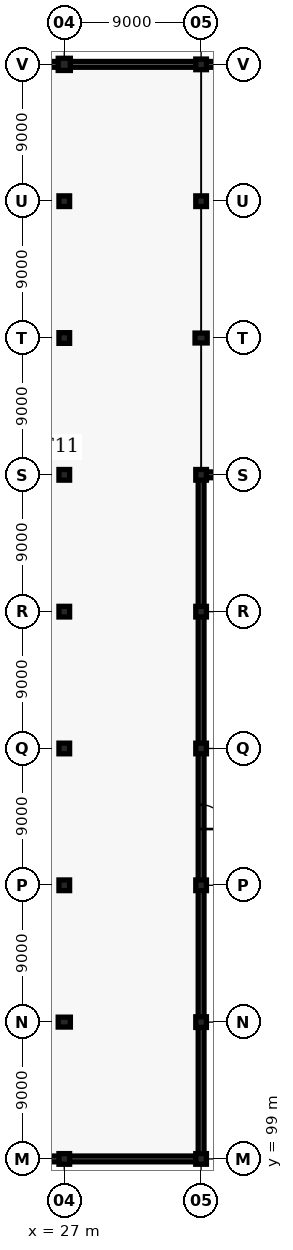
"""IFC4 building model, lengths in metres.
Left out: names, types, materials, properties, quantities, classifications, styles, units other than length and angle.
Written with IfcOpenShell. Run it as: python <this file> out.ifc"""

import sys

from ifc_helpers import new_model, si_unit, direction, frame, frame_2d, origin, origin_2d, place, context, subcontext, project, spatial, rectangle, circle, extrude, element, fill, save


model = new_model("IFC4")
c1 = context("Model", 3, precision=1e-05, world=origin(), true_north=direction((0.0, 1.0)))
c2 = subcontext(c1, "Body", "Model", "MODEL_VIEW")
j1 = project(units=[si_unit("LENGTHUNIT", "METRE"), si_unit("PLANEANGLEUNIT", "RADIAN")], contexts=[c1])
p1 = place(None, origin())
s1 = spatial("IfcSite", under=j1, at=p1, CompositionType="ELEMENT")
p2 = place(p1, origin())
s2 = spatial("IfcBuilding", under=s1, at=p2, CompositionType="ELEMENT")
p3 = place(p2, origin())
s3 = spatial("IfcBuildingStorey", under=s2, at=p3, CompositionType="ELEMENT", Elevation=0.0)
p4 = place(p3, frame((27.0, 99.0, 0.0), z_axis=(0.0, 0.0, 1.0), x_axis=(1.0, 0.0, 0.0)))
e1 = element("IfcColumn", 1, at=p4, inside=s3, PredefinedType="COLUMN", context=c2, shape_type="SweptSolid", body=[
    extrude(rectangle(XDim=0.7, YDim=0.7, at=origin_2d()), origin(), (0.0, 0.0, 1.0), 5.4),
])
p5 = place(p3, frame((27.0, 108.0, 0.0), z_axis=(0.0, 0.0, 1.0), x_axis=(1.0, 0.0, 0.0)))
e2 = element("IfcColumn", 2, at=p5, inside=s3, PredefinedType="COLUMN", context=c2, shape_type="SweptSolid", body=[
    extrude(rectangle(XDim=0.8, YDim=0.65, at=origin_2d()), origin(), (0.0, 0.0, 1.0), 5.4),
])
for number, where, z_axis, x_axis in (
    (3, (27.0, 117.0, 0.0), (0.0, 0.0, 1.0), (1.0, 0.0, 0.0)),
    (4, (27.0, 126.0, 0.0), (0.0, 0.0, 1.0), (1.0, 0.0, 0.0)),
    (5, (27.0, 135.0, 0.0), (0.0, 0.0, 1.0), (1.0, 0.0, 0.0)),
    (6, (27.0, 144.0, 0.0), (0.0, 0.0, 1.0), (1.0, 0.0, 0.0)),
    (7, (27.0, 153.0, 0.0), (0.0, 0.0, 1.0), (1.0, 0.0, 0.0)),
    (8, (27.0, 162.0, 0.0), (0.0, 0.0, 1.0), (1.0, 0.0, 0.0)),
):
    element("IfcColumn", number, at=place(p3, frame(where, z_axis=z_axis, x_axis=x_axis)), inside=s3, PredefinedType="COLUMN", context=c2, shape_type="SweptSolid", body=[
        extrude(rectangle(XDim=0.7, YDim=0.7, at=origin_2d()), origin(), (0.0, 0.0, 1.0), 5.4),
    ])
p6 = place(p3, frame((27.0, 171.0, 0.0), z_axis=(0.0, 0.0, 1.0), x_axis=(1.0, 0.0, 0.0)))
e9 = element("IfcColumn", 9, at=p6, inside=s3, PredefinedType="COLUMN", context=c2, shape_type="SweptSolid", body=[
    extrude(circle(Radius=0.4, at=origin_2d()), origin(), (0.0, 0.0, 1.0), 5.4),
])
for number, where, z_axis, x_axis in (
    (10, (36.0, 99.0, 0.0), (0.0, 0.0, 1.0), (1.0, 0.0, 0.0)),
    (11, (36.0, 108.0, 0.0), (0.0, 0.0, 1.0), (1.0, 0.0, 0.0)),
    (12, (36.0, 117.0, 0.0), (0.0, 0.0, 1.0), (1.0, 0.0, 0.0)),
    (13, (36.0, 126.0, 0.0), (0.0, 0.0, 1.0), (1.0, 0.0, 0.0)),
    (14, (36.0, 135.0, 0.0), (0.0, 0.0, 1.0), (1.0, 0.0, 0.0)),
    (15, (36.0, 144.0, 0.0), (0.0, 0.0, 1.0), (1.0, 0.0, 0.0)),
):
    element("IfcColumn", number, at=place(p3, frame(where, z_axis=z_axis, x_axis=x_axis)), inside=s3, PredefinedType="COLUMN", context=c2, shape_type="SweptSolid", body=[
        extrude(rectangle(XDim=0.7, YDim=0.7, at=origin_2d()), origin(), (0.0, 0.0, 1.0), 5.4),
    ])
p7 = place(p3, frame((36.0, 153.0, 0.0), z_axis=(0.0, 0.0, 1.0), x_axis=(1.0, 0.0, 0.0)))
e16 = element("IfcColumn", 16, at=p7, inside=s3, PredefinedType="COLUMN", context=c2, shape_type="SweptSolid", body=[
    extrude(rectangle(XDim=0.8, YDim=0.65, at=origin_2d()), origin(), (0.0, 0.0, 1.0), 5.4),
])
for number, where, z_axis, x_axis in (
    (17, (36.0, 162.0, 0.0), (0.0, 0.0, 1.0), (1.0, 0.0, 0.0)),
    (18, (36.0, 171.0, 0.0), (0.0, 0.0, 1.0), (1.0, 0.0, 0.0)),
):
    element("IfcColumn", number, at=place(p3, frame(where, z_axis=z_axis, x_axis=x_axis)), inside=s3, PredefinedType="COLUMN", context=c2, shape_type="SweptSolid", body=[
        extrude(rectangle(XDim=0.7, YDim=0.7, at=origin_2d()), origin(), (0.0, 0.0, 1.0), 5.4),
    ])
for number, where, z_axis, x_axis in (
    (19, (18.06, 171.0, 0.0), (0.0, 0.0, 1.0), (1.0, 0.0, 0.0)),
    (20, (27.06, 171.0, 0.0), (0.0, 0.0, 1.0), (1.0, 0.0, 0.0)),
):
    element("IfcWall", number, at=place(p3, frame(where, z_axis=z_axis, x_axis=x_axis)), inside=s3, PredefinedType="SOLIDWALL", context=c2, shape_type="SweptSolid", body=[
        extrude(rectangle(XDim=8.88, YDim=0.38, at=frame_2d((4.44, 0.0))), origin(), (0.0, 0.0, 1.0), 4.55),
    ])
p8 = place(p3, frame((36.06, 171.0, 0.0), z_axis=(0.0, 0.0, 1.0), x_axis=(1.0, 0.0, 0.0)))
e21 = element("IfcWall", 21, at=p8, inside=s3, PredefinedType="SOLIDWALL", context=c2, shape_type="SweptSolid", body=[
    extrude(rectangle(XDim=8.88, YDim=0.38, at=frame_2d((4.44, 0.0))), origin(), (0.0, 0.0, 1.0), 4.55),
])
p9 = place(p8, frame((2.64, 0.0, 0.0)))
e22 = element("IfcOpeningElement", 22, at=p9, cuts=e21, PredefinedType="OPENING", context=c2, shape_type="SweptSolid", body=[
    extrude(rectangle(XDim=3.6, YDim=4.0, at=frame_2d((1.8, 2.0))), frame((0.0, 0.2, 0.0), z_axis=(0.0, -1.0, 0.0), x_axis=(1.0, 0.0, 0.0)), (0.0, 0.0, 1.0), 0.4),
])
for number, where, z_axis, x_axis in (
    (23, (18.06, 99.0, 0.0), (0.0, 0.0, 1.0), (1.0, 0.0, 0.0)),
    (24, (27.06, 99.0, 0.0), (0.0, 0.0, 1.0), (1.0, 0.0, 0.0)),
    (25, (36.0, 99.06, 0.0), (0.0, 0.0, 1.0), (0.0, 1.0, 0.0)),
    (26, (36.0, 108.06, 0.0), (0.0, 0.0, 1.0), (0.0, 1.0, 0.0)),
):
    element("IfcWall", number, at=place(p3, frame(where, z_axis=z_axis, x_axis=x_axis)), inside=s3, PredefinedType="SOLIDWALL", context=c2, shape_type="SweptSolid", body=[
        extrude(rectangle(XDim=8.88, YDim=0.38, at=frame_2d((4.44, 0.0))), origin(), (0.0, 0.0, 1.0), 4.55),
    ])
p10 = place(p3, frame((36.0, 117.06, 0.0), z_axis=(0.0, 0.0, 1.0), x_axis=(0.0, 1.0, 0.0)))
e27 = element("IfcWall", 27, at=p10, inside=s3, PredefinedType="SOLIDWALL", context=c2, shape_type="SweptSolid", body=[
    extrude(rectangle(XDim=8.88, YDim=0.38, at=frame_2d((4.44, 0.0))), origin(), (0.0, 0.0, 1.0), 4.55),
])
p11 = place(p10, frame((3.64, 0.0, 0.0)))
e28 = element("IfcOpeningElement", 28, at=p11, cuts=e27, PredefinedType="OPENING", context=c2, shape_type="SweptSolid", body=[
    extrude(rectangle(XDim=1.6, YDim=2.25, at=frame_2d((0.8, 1.125))), frame((0.0, 0.2, 0.0), z_axis=(0.0, -1.0, 0.0), x_axis=(1.0, 0.0, 0.0)), (0.0, 0.0, 1.0), 0.4),
])
for number, where, z_axis, x_axis in (
    (29, (36.0, 126.06, 0.0), (0.0, 0.0, 1.0), (0.0, 1.0, 0.0)),
    (30, (36.0, 135.06, 0.0), (0.0, 0.0, 1.0), (0.0, 1.0, 0.0)),
    (31, (36.06, 144.0, 0.0), (0.0, 0.0, 1.0), (1.0, 0.0, 0.0)),
):
    element("IfcWall", number, at=place(p3, frame(where, z_axis=z_axis, x_axis=x_axis)), inside=s3, PredefinedType="SOLIDWALL", context=c2, shape_type="SweptSolid", body=[
        extrude(rectangle(XDim=8.88, YDim=0.38, at=frame_2d((4.44, 0.0))), origin(), (0.0, 0.0, 1.0), 4.55),
    ])
p12 = place(p11, frame((1.6, 0.0, 0.0), z_axis=(0.0, 0.0, 1.0), x_axis=(-1.0, 0.0, 0.0)))
e32 = element("IfcDoor", 32, at=p12, inside=s3, OperationType="DOUBLE_DOOR_SINGLE_SWING", PredefinedType="DOOR", context=c2, shape_type="SweptSolid", body=[
    extrude(rectangle(XDim=1.6, YDim=2.25, at=frame_2d((0.8, 1.125))), frame((0.0, 0.025, 0.0), z_axis=(0.0, -1.0, 0.0), x_axis=(1.0, 0.0, 0.0)), (0.0, 0.0, 1.0), 0.05),
])
fill(e28, e32)
save(model, sys.argv[1])
